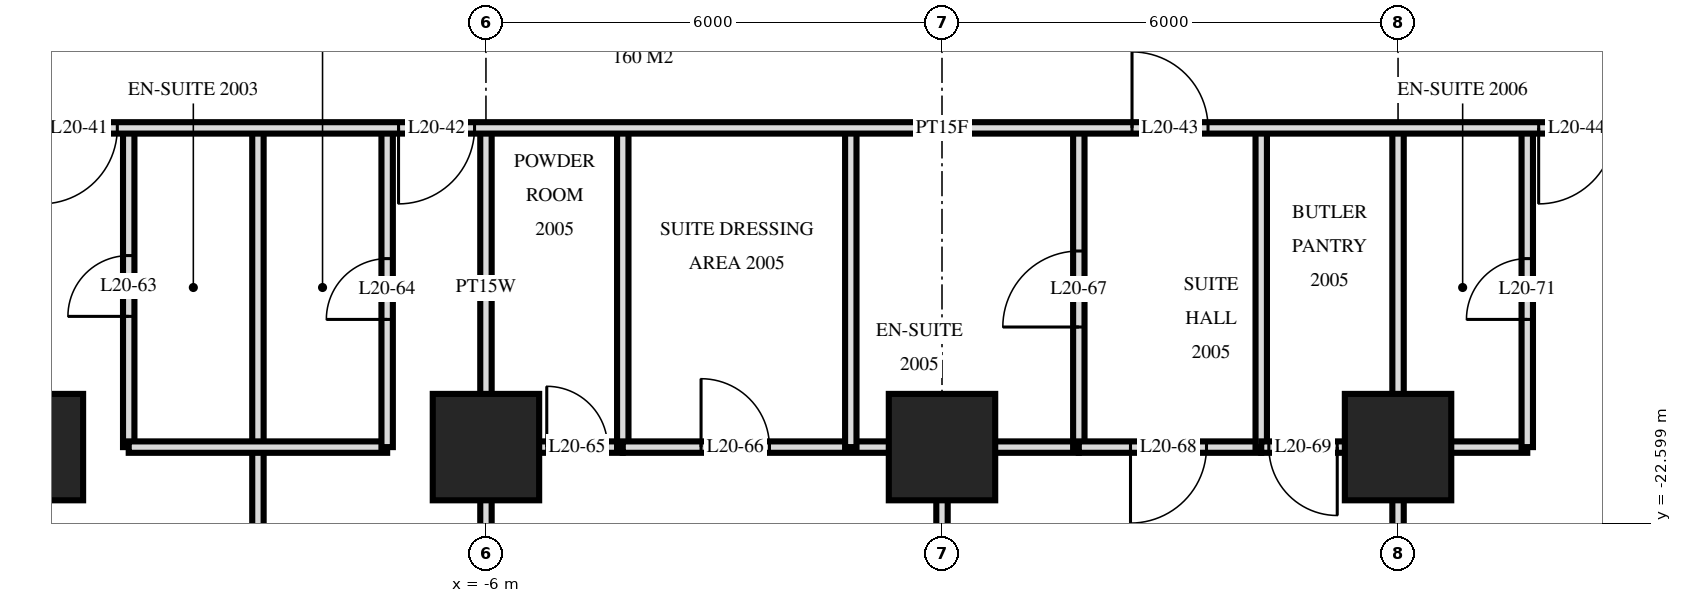
"""IFC4 building model, lengths in metres.
Left out: names, types, materials, properties, quantities, classifications, styles, units other than length and angle.
Written with IfcOpenShell. Run it as: python <this file> out.ifc"""

import sys

from ifc_helpers import new_model, si_unit, direction, frame, frame_2d, origin, origin_2d, place, context, subcontext, project, spatial, rectangle, extrude, element, fill, save


model = new_model("IFC4")
c1 = context("Model", 3, precision=1e-05, world=origin(), true_north=direction((0.0, 1.0)))
c2 = subcontext(c1, "Body", "Model", "MODEL_VIEW")
j1 = project(units=[si_unit("LENGTHUNIT", "METRE"), si_unit("PLANEANGLEUNIT", "RADIAN")], contexts=[c1])
p1 = place(None, origin())
s1 = spatial("IfcSite", under=j1, at=p1, CompositionType="ELEMENT")
p2 = place(p1, origin())
s2 = spatial("IfcBuilding", under=s1, at=p2, CompositionType="ELEMENT")
p3 = place(p2, frame((0.0, 0.0, 81.6)))
s3 = spatial("IfcBuildingStorey", under=s2, at=p3, CompositionType="ELEMENT", Elevation=81.6)
for number, where, z_axis, x_axis in (
    (1, (-12.0, -21.6, 0.0), (0.0, 0.0, 1.0), (1.0, 0.0, 0.0)),
    (2, (-6.0, -21.6, 0.0), (0.0, 0.0, 1.0), (1.0, 0.0, 0.0)),
    (3, (0.0, -21.6, 0.0), (0.0, 0.0, 1.0), (1.0, 0.0, 0.0)),
    (4, (6.0, -21.6, 0.0), (0.0, 0.0, 1.0), (1.0, 0.0, 0.0)),
):
    element("IfcColumn", number, at=place(p3, frame(where, z_axis=z_axis, x_axis=x_axis)), inside=s3, PredefinedType="COLUMN", context=c2, shape_type="SweptSolid", body=[
        extrude(rectangle(XDim=1.4, YDim=1.4, at=origin_2d()), origin(), (0.0, 0.0, 1.0), 3.6),
    ])
p4 = place(p3, frame((7.7, -21.6, 0.0), z_axis=(0.0, 0.0, 1.0), x_axis=(0.0, 1.0, 0.0)))
e5 = element("IfcWall", 5, at=p4, inside=s3, PredefinedType="PARTITIONING", context=c2, shape_type="SweptSolid", body=[
    extrude(rectangle(XDim=4.2, YDim=0.15, at=frame_2d((2.1, 0.0))), origin(), (0.0, 0.0, 1.0), 3.32),
])
p5 = place(p4, frame((1.68, 0.0, 0.0)))
e6 = element("IfcOpeningElement", 6, at=p5, cuts=e5, PredefinedType="OPENING", context=c2, shape_type="SweptSolid", body=[
    extrude(rectangle(XDim=0.8, YDim=2.1, at=frame_2d((0.4, 1.05))), frame((0.0, 0.085, 0.0), z_axis=(0.0, -1.0, 0.0), x_axis=(1.0, 0.0, 0.0)), (0.0, 0.0, 1.0), 0.17),
])
p6 = place(p3, frame((6.0, -29.22, 0.0), z_axis=(0.0, 0.0, 1.0), x_axis=(0.0, 1.0, 0.0)))
e7 = element("IfcWall", 7, at=p6, inside=s3, PredefinedType="PARTITIONING", context=c2, shape_type="SweptSolid", body=[
    extrude(rectangle(XDim=11.82, YDim=0.15, at=frame_2d((5.91, 0.0))), origin(), (0.0, 0.0, 1.0), 3.32),
])
p7 = place(p3, frame((4.2, -21.6, 0.0), z_axis=(0.0, 0.0, 1.0), x_axis=(0.0, 1.0, 0.0)))
e8 = element("IfcWall", 8, at=p7, inside=s3, PredefinedType="PARTITIONING", context=c2, shape_type="SweptSolid", body=[
    extrude(rectangle(XDim=4.2, YDim=0.15, at=frame_2d((2.1, 0.0))), origin(), (0.0, 0.0, 1.0), 3.32),
])
p8 = place(p3, frame((1.8, -21.6, 0.0), z_axis=(0.0, 0.0, 1.0), x_axis=(0.0, 1.0, 0.0)))
e9 = element("IfcWall", 9, at=p8, inside=s3, PredefinedType="PARTITIONING", context=c2, shape_type="SweptSolid", body=[
    extrude(rectangle(XDim=4.2, YDim=0.15, at=frame_2d((2.1, 0.0))), origin(), (0.0, 0.0, 1.0), 3.32),
])
p9 = place(p8, frame((1.58, 0.0, 0.0)))
e10 = element("IfcOpeningElement", 10, at=p9, cuts=e9, PredefinedType="OPENING", context=c2, shape_type="SweptSolid", body=[
    extrude(rectangle(XDim=1.0, YDim=2.1, at=frame_2d((0.5, 1.05))), frame((0.0, 0.085, 0.0), z_axis=(0.0, -1.0, 0.0), x_axis=(1.0, 0.0, 0.0)), (0.0, 0.0, 1.0), 0.17),
])
p10 = place(p3, frame((0.0, -29.22, 0.0), z_axis=(0.0, 0.0, 1.0), x_axis=(0.0, 1.0, 0.0)))
e11 = element("IfcWall", 11, at=p10, inside=s3, PredefinedType="PARTITIONING", context=c2, shape_type="SweptSolid", body=[
    extrude(rectangle(XDim=7.62, YDim=0.15, at=frame_2d((3.81, 0.0))), origin(), (0.0, 0.0, 1.0), 3.32),
])
p11 = place(p10, frame((3.29, 0.0, 0.0)))
e12 = element("IfcOpeningElement", 12, at=p11, cuts=e11, PredefinedType="OPENING", context=c2, shape_type="SweptSolid", body=[
    extrude(rectangle(XDim=0.9, YDim=2.1, at=frame_2d((0.45, 1.05))), frame((0.0, 0.085, 0.0), z_axis=(0.0, -1.0, 0.0), x_axis=(1.0, 0.0, 0.0)), (0.0, 0.0, 1.0), 0.17),
])
p12 = place(p3, frame((-1.2, -21.6, 0.0), z_axis=(0.0, 0.0, 1.0), x_axis=(0.0, 1.0, 0.0)))
e13 = element("IfcWall", 13, at=p12, inside=s3, PredefinedType="PARTITIONING", context=c2, shape_type="SweptSolid", body=[
    extrude(rectangle(XDim=4.2, YDim=0.15, at=frame_2d((2.1, 0.0))), origin(), (0.0, 0.0, 1.0), 3.32),
])
p13 = place(p3, frame((-4.2, -21.6, 0.0), z_axis=(0.0, 0.0, 1.0), x_axis=(0.0, 1.0, 0.0)))
e14 = element("IfcWall", 14, at=p13, inside=s3, PredefinedType="PLUMBINGWALL", context=c2, shape_type="SweptSolid", body=[
    extrude(rectangle(XDim=4.2, YDim=0.15, at=frame_2d((2.1, 0.0))), origin(), (0.0, 0.0, 1.0), 3.32),
])
p14 = place(p3, frame((-6.0, -29.22, 0.0), z_axis=(0.0, 0.0, 1.0), x_axis=(0.0, 1.0, 0.0)))
e15 = element("IfcWall", 15, at=p14, inside=s3, PredefinedType="PARTITIONING", context=c2, shape_type="SweptSolid", body=[
    extrude(rectangle(XDim=7.62, YDim=0.15, at=frame_2d((3.81, 0.0))), origin(), (0.0, 0.0, 1.0), 3.32),
])
p15 = place(p3, frame((-6.0, -21.6, 0.0), z_axis=(0.0, 0.0, 1.0), x_axis=(0.0, 1.0, 0.0)))
e16 = element("IfcWall", 16, at=p15, inside=s3, PredefinedType="PLUMBINGWALL", context=c2, shape_type="SweptSolid", body=[
    extrude(rectangle(XDim=4.2, YDim=0.15, at=frame_2d((2.1, 0.0))), origin(), (0.0, 0.0, 1.0), 3.32),
])
p16 = place(p3, frame((-7.3, -21.6, 0.0), z_axis=(0.0, 0.0, 1.0), x_axis=(0.0, 1.0, 0.0)))
e17 = element("IfcWall", 17, at=p16, inside=s3, PredefinedType="PARTITIONING", context=c2, shape_type="SweptSolid", body=[
    extrude(rectangle(XDim=4.2, YDim=0.15, at=frame_2d((2.1, 0.0))), origin(), (0.0, 0.0, 1.0), 3.32),
])
p17 = place(p16, frame((1.68, 0.0, 0.0)))
e18 = element("IfcOpeningElement", 18, at=p17, cuts=e17, PredefinedType="OPENING", context=c2, shape_type="SweptSolid", body=[
    extrude(rectangle(XDim=0.8, YDim=2.1, at=frame_2d((0.4, 1.05))), frame((0.0, 0.085, 0.0), z_axis=(0.0, -1.0, 0.0), x_axis=(1.0, 0.0, 0.0)), (0.0, 0.0, 1.0), 0.17),
])
p18 = place(p3, frame((-9.0, -29.22, 0.0), z_axis=(0.0, 0.0, 1.0), x_axis=(0.0, 1.0, 0.0)))
e19 = element("IfcWall", 19, at=p18, inside=s3, PredefinedType="PARTITIONING", context=c2, shape_type="SweptSolid", body=[
    extrude(rectangle(XDim=11.82, YDim=0.15, at=frame_2d((5.91, 0.0))), origin(), (0.0, 0.0, 1.0), 3.32),
])
p19 = place(p3, frame((-10.7, -21.6, 0.0), z_axis=(0.0, 0.0, 1.0), x_axis=(0.0, 1.0, 0.0)))
e20 = element("IfcWall", 20, at=p19, inside=s3, PredefinedType="PARTITIONING", context=c2, shape_type="SweptSolid", body=[
    extrude(rectangle(XDim=4.2, YDim=0.15, at=frame_2d((2.1, 0.0))), origin(), (0.0, 0.0, 1.0), 3.32),
])
p20 = place(p19, frame((1.72, 0.0, 0.0)))
e21 = element("IfcOpeningElement", 21, at=p20, cuts=e20, PredefinedType="OPENING", context=c2, shape_type="SweptSolid", body=[
    extrude(rectangle(XDim=0.8, YDim=2.1, at=frame_2d((0.4, 1.05))), frame((0.0, 0.085, 0.0), z_axis=(0.0, -1.0, 0.0), x_axis=(1.0, 0.0, 0.0)), (0.0, 0.0, 1.0), 0.17),
])
p21 = place(p3, frame((1.8, -21.6, 0.0), z_axis=(0.0, 0.0, 1.0), x_axis=(1.0, 0.0, 0.0)))
e22 = element("IfcWall", 22, at=p21, inside=s3, PredefinedType="PARTITIONING", context=c2, shape_type="SweptSolid", body=[
    extrude(rectangle(XDim=2.4, YDim=0.15, at=frame_2d((1.2, 0.0))), origin(), (0.0, 0.0, 1.0), 3.32),
])
p22 = place(p21, frame((0.68, 0.0, 0.0)))
e23 = element("IfcOpeningElement", 23, at=p22, cuts=e22, PredefinedType="OPENING", context=c2, shape_type="SweptSolid", body=[
    extrude(rectangle(XDim=1.0, YDim=2.1, at=frame_2d((0.5, 1.05))), frame((0.0, 0.085, 0.0), z_axis=(0.0, -1.0, 0.0), x_axis=(1.0, 0.0, 0.0)), (0.0, 0.0, 1.0), 0.17),
])
p23 = place(p3, frame((-10.7, -21.6, 0.0), z_axis=(0.0, 0.0, 1.0), x_axis=(1.0, 0.0, 0.0)))
e24 = element("IfcWall", 24, at=p23, inside=s3, PredefinedType="PARTITIONING", context=c2, shape_type="SweptSolid", body=[
    extrude(rectangle(XDim=3.4, YDim=0.15, at=frame_2d((1.7, 0.0))), origin(), (0.0, 0.0, 1.0), 3.32),
])
p24 = place(p3, frame((-4.2, -21.6, 0.0), z_axis=(0.0, 0.0, 1.0), x_axis=(1.0, 0.0, 0.0)))
e25 = element("IfcWall", 25, at=p24, inside=s3, PredefinedType="PARTITIONING", context=c2, shape_type="SweptSolid", body=[
    extrude(rectangle(XDim=6.0, YDim=0.15, at=frame_2d((3.0, 0.0))), origin(), (0.0, 0.0, 1.0), 3.32),
])
p25 = place(p24, frame((1.03, 0.0, 0.0)))
e26 = element("IfcOpeningElement", 26, at=p25, cuts=e25, PredefinedType="OPENING", context=c2, shape_type="SweptSolid", body=[
    extrude(rectangle(XDim=0.9, YDim=2.1, at=frame_2d((0.45, 1.05))), frame((0.0, 0.085, 0.0), z_axis=(0.0, -1.0, 0.0), x_axis=(1.0, 0.0, 0.0)), (0.0, 0.0, 1.0), 0.17),
])
p26 = place(p3, frame((4.2, -21.6, 0.0), z_axis=(0.0, 0.0, 1.0), x_axis=(1.0, 0.0, 0.0)))
e27 = element("IfcWall", 27, at=p26, inside=s3, PredefinedType="PARTITIONING", context=c2, shape_type="SweptSolid", body=[
    extrude(rectangle(XDim=3.5, YDim=0.15, at=frame_2d((1.75, 0.0))), origin(), (0.0, 0.0, 1.0), 3.32),
])
p27 = place(p26, frame((0.1, 0.0, 0.0)))
e28 = element("IfcOpeningElement", 28, at=p27, cuts=e27, PredefinedType="OPENING", context=c2, shape_type="SweptSolid", body=[
    extrude(rectangle(XDim=0.9, YDim=2.1, at=frame_2d((0.45, 1.05))), frame((0.0, 0.085, 0.0), z_axis=(0.0, -1.0, 0.0), x_axis=(1.0, 0.0, 0.0)), (0.0, 0.0, 1.0), 0.17),
])
p28 = place(p3, frame((-6.0, -21.6, 0.0), z_axis=(0.0, 0.0, 1.0), x_axis=(1.0, 0.0, 0.0)))
e29 = element("IfcWall", 29, at=p28, inside=s3, PredefinedType="PLUMBINGWALL", context=c2, shape_type="SweptSolid", body=[
    extrude(rectangle(XDim=1.8, YDim=0.15, at=frame_2d((0.9, 0.0))), origin(), (0.0, 0.0, 1.0), 3.32),
])
p29 = place(p28, frame((0.8, 0.0, 0.0)))
e30 = element("IfcOpeningElement", 30, at=p29, cuts=e29, PredefinedType="OPENING", context=c2, shape_type="SweptSolid", body=[
    extrude(rectangle(XDim=0.8, YDim=2.1, at=frame_2d((0.4, 1.05))), frame((0.0, 0.085, 0.0), z_axis=(0.0, -1.0, 0.0), x_axis=(1.0, 0.0, 0.0)), (0.0, 0.0, 1.0), 0.17),
])
p30 = place(p3, frame((-33.12, -17.4, 0.0), z_axis=(0.0, 0.0, 1.0), x_axis=(1.0, 0.0, 0.0)))
e31 = element("IfcWall", 31, at=p30, inside=s3, PredefinedType="PARTITIONING", context=c2, shape_type="SweptSolid", body=[
    extrude(rectangle(XDim=66.24, YDim=0.15, at=frame_2d((33.12, 0.0))), origin(), (0.0, 0.0, 1.0), 3.32),
])
p31 = place(p30, frame((9.27, 0.0, 0.0)))
e32 = element("IfcOpeningElement", 32, at=p31, cuts=e31, PredefinedType="OPENING", context=c2, shape_type="SweptSolid", body=[
    extrude(rectangle(XDim=1.0, YDim=2.1, at=frame_2d((0.5, 1.05))), frame((0.0, 0.085, 0.0), z_axis=(0.0, -1.0, 0.0), x_axis=(1.0, 0.0, 0.0)), (0.0, 0.0, 1.0), 0.17),
])
p32 = place(p30, frame((13.97, 0.0, 0.0)))
e33 = element("IfcOpeningElement", 33, at=p32, cuts=e31, PredefinedType="OPENING", context=c2, shape_type="SweptSolid", body=[
    extrude(rectangle(XDim=1.0, YDim=2.1, at=frame_2d((0.5, 1.05))), frame((0.0, 0.085, 0.0), z_axis=(0.0, -1.0, 0.0), x_axis=(1.0, 0.0, 0.0)), (0.0, 0.0, 1.0), 0.17),
])
p33 = place(p30, frame((17.62, 0.0, 0.0)))
e34 = element("IfcOpeningElement", 34, at=p33, cuts=e31, PredefinedType="OPENING", context=c2, shape_type="SweptSolid", body=[
    extrude(rectangle(XDim=1.0, YDim=2.1, at=frame_2d((0.5, 1.05))), frame((0.0, 0.085, 0.0), z_axis=(0.0, -1.0, 0.0), x_axis=(1.0, 0.0, 0.0)), (0.0, 0.0, 1.0), 0.17),
])
p34 = place(p30, frame((21.27, 0.0, 0.0)))
e35 = element("IfcOpeningElement", 35, at=p34, cuts=e31, PredefinedType="OPENING", context=c2, shape_type="SweptSolid", body=[
    extrude(rectangle(XDim=1.0, YDim=2.1, at=frame_2d((0.5, 1.05))), frame((0.0, 0.085, 0.0), z_axis=(0.0, -1.0, 0.0), x_axis=(1.0, 0.0, 0.0)), (0.0, 0.0, 1.0), 0.17),
])
p35 = place(p30, frame((25.97, 0.0, 0.0)))
e36 = element("IfcOpeningElement", 36, at=p35, cuts=e31, PredefinedType="OPENING", context=c2, shape_type="SweptSolid", body=[
    extrude(rectangle(XDim=1.0, YDim=2.1, at=frame_2d((0.5, 1.05))), frame((0.0, 0.085, 0.0), z_axis=(0.0, -1.0, 0.0), x_axis=(1.0, 0.0, 0.0)), (0.0, 0.0, 1.0), 0.17),
])
p36 = place(p30, frame((35.62, 0.0, 0.0)))
e37 = element("IfcOpeningElement", 37, at=p36, cuts=e31, PredefinedType="OPENING", context=c2, shape_type="SweptSolid", body=[
    extrude(rectangle(XDim=1.0, YDim=2.1, at=frame_2d((0.5, 1.05))), frame((0.0, 0.085, 0.0), z_axis=(0.0, -1.0, 0.0), x_axis=(1.0, 0.0, 0.0)), (0.0, 0.0, 1.0), 0.17),
])
p37 = place(p30, frame((40.97, 0.0, 0.0)))
e38 = element("IfcOpeningElement", 38, at=p37, cuts=e31, PredefinedType="OPENING", context=c2, shape_type="SweptSolid", body=[
    extrude(rectangle(XDim=1.0, YDim=2.1, at=frame_2d((0.5, 1.05))), frame((0.0, 0.085, 0.0), z_axis=(0.0, -1.0, 0.0), x_axis=(1.0, 0.0, 0.0)), (0.0, 0.0, 1.0), 0.17),
])
p38 = place(p30, frame((42.27, 0.0, 0.0)))
e39 = element("IfcOpeningElement", 39, at=p38, cuts=e31, PredefinedType="OPENING", context=c2, shape_type="SweptSolid", body=[
    extrude(rectangle(XDim=1.0, YDim=2.1, at=frame_2d((0.5, 1.05))), frame((0.0, 0.085, 0.0), z_axis=(0.0, -1.0, 0.0), x_axis=(1.0, 0.0, 0.0)), (0.0, 0.0, 1.0), 0.17),
])
p39 = place(p30, frame((46.97, 0.0, 0.0)))
e40 = element("IfcOpeningElement", 40, at=p39, cuts=e31, PredefinedType="OPENING", context=c2, shape_type="SweptSolid", body=[
    extrude(rectangle(XDim=1.0, YDim=2.1, at=frame_2d((0.5, 1.05))), frame((0.0, 0.085, 0.0), z_axis=(0.0, -1.0, 0.0), x_axis=(1.0, 0.0, 0.0)), (0.0, 0.0, 1.0), 0.17),
])
p40 = place(p30, frame((48.27, 0.0, 0.0)))
e41 = element("IfcOpeningElement", 41, at=p40, cuts=e31, PredefinedType="OPENING", context=c2, shape_type="SweptSolid", body=[
    extrude(rectangle(XDim=1.0, YDim=2.1, at=frame_2d((0.5, 1.05))), frame((0.0, 0.085, 0.0), z_axis=(0.0, -1.0, 0.0), x_axis=(1.0, 0.0, 0.0)), (0.0, 0.0, 1.0), 0.17),
])
p41 = place(p30, frame((1.87, 0.0, 0.0)))
e42 = element("IfcOpeningElement", 42, at=p41, cuts=e31, PredefinedType="OPENING", context=c2, shape_type="SweptSolid", body=[
    extrude(rectangle(XDim=1.0, YDim=2.1, at=frame_2d((0.5, 1.05))), frame((0.0, 0.085, 0.0), z_axis=(0.0, -1.0, 0.0), x_axis=(1.0, 0.0, 0.0)), (0.0, 0.0, 1.0), 0.17),
])
p42 = place(p30, frame((60.37, 0.0, 0.0)))
e43 = element("IfcOpeningElement", 43, at=p42, cuts=e31, PredefinedType="OPENING", context=c2, shape_type="SweptSolid", body=[
    extrude(rectangle(XDim=1.0, YDim=2.1, at=frame_2d((0.5, 1.05))), frame((0.0, 0.085, 0.0), z_axis=(0.0, -1.0, 0.0), x_axis=(1.0, 0.0, 0.0)), (0.0, 0.0, 1.0), 0.17),
])
p43 = place(p34, frame((0.5, 0.0, 0.0), z_axis=(0.0, 0.0, 1.0), x_axis=(-1.0, 0.0, 0.0)))
e44 = element("IfcDoor", 44, at=p43, inside=s3, OperationType="SINGLE_SWING_LEFT", PredefinedType="DOOR", context=c2, shape_type="SweptSolid", body=[
    extrude(rectangle(XDim=1.0, YDim=2.1, at=frame_2d((0.0, 1.05))), frame((0.0, -0.025, 0.0), z_axis=(0.0, 1.0, 0.0), x_axis=(-1.0, 0.0, 0.0)), (0.0, 0.0, 1.0), 0.05),
])
fill(e35, e44)
p44 = place(p35, frame((0.5, 0.0, 0.0), z_axis=(0.0, 0.0, 1.0), x_axis=(-1.0, 0.0, 0.0)))
e45 = element("IfcDoor", 45, at=p44, inside=s3, OperationType="SINGLE_SWING_LEFT", PredefinedType="DOOR", context=c2, shape_type="SweptSolid", body=[
    extrude(rectangle(XDim=1.0, YDim=2.1, at=frame_2d((0.0, 1.05))), frame((0.0, -0.025, 0.0), z_axis=(0.0, 1.0, 0.0), x_axis=(-1.0, 0.0, 0.0)), (0.0, 0.0, 1.0), 0.05),
])
fill(e36, e45)
p45 = place(p36, origin())
e46 = element("IfcDoor", 46, at=p45, inside=s3, OperationType="SINGLE_SWING_RIGHT", PredefinedType="DOOR", context=c2, shape_type="SweptSolid", body=[
    extrude(rectangle(XDim=1.0, YDim=2.1, at=frame_2d((0.5, 1.05))), frame((0.0, 0.025, 0.0), z_axis=(0.0, -1.0, 0.0), x_axis=(1.0, 0.0, 0.0)), (0.0, 0.0, 1.0), 0.05),
])
fill(e37, e46)
p46 = place(p37, frame((0.5, 0.0, 0.0), z_axis=(0.0, 0.0, 1.0), x_axis=(-1.0, 0.0, 0.0)))
e47 = element("IfcDoor", 47, at=p46, inside=s3, OperationType="SINGLE_SWING_LEFT", PredefinedType="DOOR", context=c2, shape_type="SweptSolid", body=[
    extrude(rectangle(XDim=1.0, YDim=2.1, at=frame_2d((0.0, 1.05))), frame((0.0, -0.025, 0.0), z_axis=(0.0, 1.0, 0.0), x_axis=(-1.0, 0.0, 0.0)), (0.0, 0.0, 1.0), 0.05),
])
fill(e38, e47)
p47 = place(p20, origin())
e48 = element("IfcDoor", 48, at=p47, inside=s3, OperationType="SINGLE_SWING_RIGHT", PredefinedType="DOOR", context=c2, shape_type="SweptSolid", body=[
    extrude(rectangle(XDim=0.8, YDim=2.1, at=frame_2d((0.4, 1.05))), frame((0.0, 0.025, 0.0), z_axis=(0.0, -1.0, 0.0), x_axis=(1.0, 0.0, 0.0)), (0.0, 0.0, 1.0), 0.05),
])
fill(e21, e48)
p48 = place(p17, origin())
e49 = element("IfcDoor", 49, at=p48, inside=s3, OperationType="SINGLE_SWING_RIGHT", PredefinedType="DOOR", context=c2, shape_type="SweptSolid", body=[
    extrude(rectangle(XDim=0.8, YDim=2.1, at=frame_2d((0.4, 1.05))), frame((0.0, 0.025, 0.0), z_axis=(0.0, -1.0, 0.0), x_axis=(1.0, 0.0, 0.0)), (0.0, 0.0, 1.0), 0.05),
])
fill(e18, e49)
p49 = place(p29, origin())
e50 = element("IfcDoor", 50, at=p49, inside=s3, OperationType="SINGLE_SWING_RIGHT", PredefinedType="DOOR", context=c2, shape_type="SweptSolid", body=[
    extrude(rectangle(XDim=0.8, YDim=2.1, at=frame_2d((0.4, 1.05))), frame((0.0, 0.025, 0.0), z_axis=(0.0, -1.0, 0.0), x_axis=(1.0, 0.0, 0.0)), (0.0, 0.0, 1.0), 0.05),
])
fill(e30, e50)
p50 = place(p25, origin())
e51 = element("IfcDoor", 51, at=p50, inside=s3, OperationType="SINGLE_SWING_RIGHT", PredefinedType="DOOR", context=c2, shape_type="SweptSolid", body=[
    extrude(rectangle(XDim=0.9, YDim=2.1, at=frame_2d((0.45, 1.05))), frame((0.0, 0.025, 0.0), z_axis=(0.0, -1.0, 0.0), x_axis=(1.0, 0.0, 0.0)), (0.0, 0.0, 1.0), 0.05),
])
fill(e26, e51)
p51 = place(p9, origin())
e52 = element("IfcDoor", 52, at=p51, inside=s3, OperationType="SINGLE_SWING_RIGHT", PredefinedType="DOOR", context=c2, shape_type="SweptSolid", body=[
    extrude(rectangle(XDim=1.0, YDim=2.1, at=frame_2d((0.5, 1.05))), frame((0.0, 0.025, 0.0), z_axis=(0.0, -1.0, 0.0), x_axis=(1.0, 0.0, 0.0)), (0.0, 0.0, 1.0), 0.05),
])
fill(e10, e52)
p52 = place(p22, frame((0.5, 0.0, 0.0), z_axis=(0.0, 0.0, 1.0), x_axis=(-1.0, 0.0, 0.0)))
e53 = element("IfcDoor", 53, at=p52, inside=s3, OperationType="SINGLE_SWING_LEFT", PredefinedType="DOOR", context=c2, shape_type="SweptSolid", body=[
    extrude(rectangle(XDim=1.0, YDim=2.1, at=frame_2d((0.0, 1.05))), frame((0.0, -0.025, 0.0), z_axis=(0.0, 1.0, 0.0), x_axis=(-1.0, 0.0, 0.0)), (0.0, 0.0, 1.0), 0.05),
])
fill(e23, e53)
p53 = place(p27, frame((0.45, 0.0, 0.0), z_axis=(0.0, 0.0, 1.0), x_axis=(-1.0, 0.0, 0.0)))
e54 = element("IfcDoor", 54, at=p53, inside=s3, OperationType="SINGLE_SWING_RIGHT", PredefinedType="DOOR", context=c2, shape_type="SweptSolid", body=[
    extrude(rectangle(XDim=0.9, YDim=2.1, at=frame_2d((0.0, 1.05))), frame((0.0, -0.025, 0.0), z_axis=(0.0, 1.0, 0.0), x_axis=(-1.0, 0.0, 0.0)), (0.0, 0.0, 1.0), 0.05),
])
fill(e28, e54)
p54 = place(p5, origin())
e55 = element("IfcDoor", 55, at=p54, inside=s3, OperationType="SINGLE_SWING_RIGHT", PredefinedType="DOOR", context=c2, shape_type="SweptSolid", body=[
    extrude(rectangle(XDim=0.8, YDim=2.1, at=frame_2d((0.4, 1.05))), frame((0.0, 0.025, 0.0), z_axis=(0.0, -1.0, 0.0), x_axis=(1.0, 0.0, 0.0)), (0.0, 0.0, 1.0), 0.05),
])
fill(e6, e55)
save(model, sys.argv[1])
